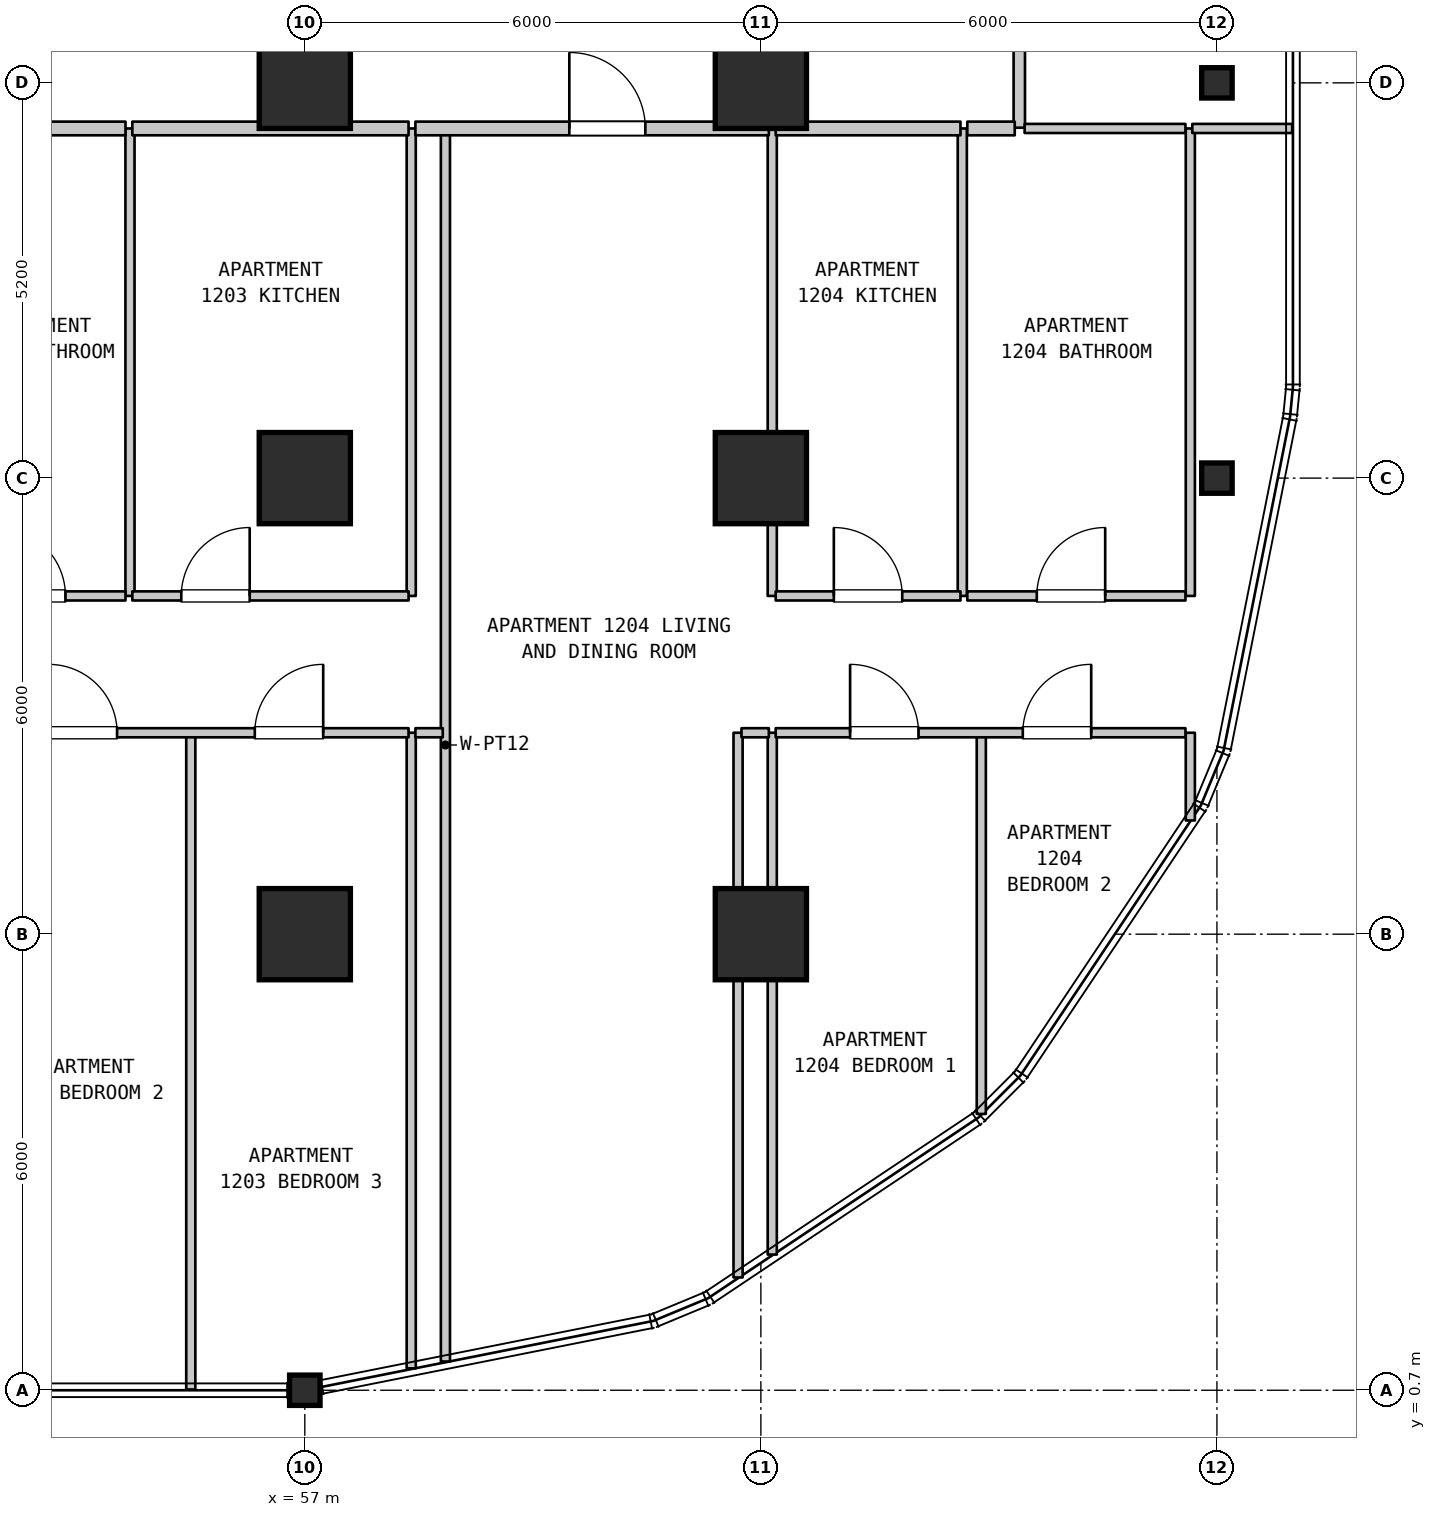
"""IFC4 building model, lengths in metres.
Left out: names, types, materials, properties, quantities, classifications, styles, units other than length and angle.
Written with IfcOpenShell. Run it as: python <this file> out.ifc"""

import sys

from ifc_helpers import new_model, si_unit, direction, frame, frame_2d, origin, origin_2d, place, context, subcontext, project, spatial, rectangle, i_section, extrude, element, fill, save


model = new_model("IFC4")
c1 = context("Model", 3, precision=1e-05, world=origin(), true_north=direction((0.0, 1.0)))
c2 = subcontext(c1, "Body", "Model", "MODEL_VIEW")
j1 = project(units=[si_unit("LENGTHUNIT", "METRE"), si_unit("PLANEANGLEUNIT", "RADIAN")], contexts=[c1])
p1 = place(None, origin())
s1 = spatial("IfcSite", under=j1, at=p1, CompositionType="ELEMENT")
p2 = place(p1, origin())
s2 = spatial("IfcBuilding", under=s1, at=p2, CompositionType="ELEMENT")
p3 = place(p2, frame((0.0, 0.0, 53.6)))
s3 = spatial("IfcBuildingStorey", under=s2, at=p3, CompositionType="ELEMENT", Elevation=53.6)
p4 = place(p3, frame((57.0, 0.7, 0.0), z_axis=(0.0, 0.0, 1.0), x_axis=(1.0, 0.0, 0.0)))
e1 = element("IfcColumn", 1, at=p4, inside=s3, PredefinedType="COLUMN", context=c2, shape_type="SweptSolid", body=[
    extrude(i_section(OverallWidth=0.401, OverallDepth=0.399, WebThickness=0.025, FlangeThickness=0.04, FilletRadius=0.015, at=origin_2d()), origin(), (0.0, 0.0, 1.0), 3.7),
])
for number, where, z_axis, x_axis in (
    (2, (57.0, 6.7, 0.0), (0.0, 0.0, 1.0), (1.0, 0.0, 0.0)),
    (3, (57.0, 12.7, 0.0), (0.0, 0.0, 1.0), (1.0, 0.0, 0.0)),
    (4, (57.0, 17.9, 0.0), (0.0, 0.0, 1.0), (1.0, 0.0, 0.0)),
    (5, (63.0, 6.7, 0.0), (0.0, 0.0, 1.0), (1.0, 0.0, 0.0)),
    (6, (63.0, 12.7, 0.0), (0.0, 0.0, 1.0), (1.0, 0.0, 0.0)),
    (7, (63.0, 17.9, 0.0), (0.0, 0.0, 1.0), (1.0, 0.0, 0.0)),
):
    element("IfcColumn", number, at=place(p3, frame(where, z_axis=z_axis, x_axis=x_axis)), inside=s3, PredefinedType="COLUMN", context=c2, shape_type="SweptSolid", body=[
        extrude(rectangle(XDim=1.2, YDim=1.2, at=origin_2d()), origin(), (0.0, 0.0, 1.0), 3.7),
    ])
for number, where, z_axis, x_axis in (
    (8, (69.0, 12.7, 0.0), (0.0, 0.0, 1.0), (1.0, 0.0, 0.0)),
    (9, (69.0, 17.9, 0.0), (0.0, 0.0, 1.0), (1.0, 0.0, 0.0)),
):
    element("IfcColumn", number, at=place(p3, frame(where, z_axis=z_axis, x_axis=x_axis)), inside=s3, PredefinedType="COLUMN", context=c2, shape_type="SweptSolid", body=[
        extrude(i_section(OverallWidth=0.401, OverallDepth=0.399, WebThickness=0.025, FlangeThickness=0.04, FilletRadius=0.015, at=origin_2d()), origin(), (0.0, 0.0, 1.0), 3.7),
    ])
p5 = place(p3, frame((54.7, 11.15, 0.0), z_axis=(0.0, 0.0, 1.0), x_axis=(0.0, 1.0, 0.0)))
e10 = element("IfcWall", 10, at=p5, inside=s3, PredefinedType="PARTITIONING", context=c2, shape_type="SweptSolid", body=[
    extrude(rectangle(XDim=6.15, YDim=0.12, at=frame_2d((3.075, 0.0))), origin(), (0.0, 0.0, 1.0), 3.385),
])
p6 = place(p3, frame((55.5, 0.71, 0.0), z_axis=(0.0, 0.0, 1.0), x_axis=(0.0, 1.0, 0.0)))
e11 = element("IfcWall", 11, at=p6, inside=s3, PredefinedType="PARTITIONING", context=c2, shape_type="SweptSolid", body=[
    extrude(rectangle(XDim=8.64, YDim=0.12, at=frame_2d((4.32, 0.0))), origin(), (0.0, 0.0, 1.0), 3.385),
])
p7 = place(p3, frame((58.4, 0.988, 0.0), z_axis=(0.0, 0.0, 1.0), x_axis=(0.0, 1.0, 0.0)))
e12 = element("IfcWall", 12, at=p7, inside=s3, PredefinedType="PARTITIONING", context=c2, shape_type="SweptSolid", body=[
    extrude(rectangle(XDim=8.362, YDim=0.12, at=frame_2d((4.181, 0.0))), origin(), (0.0, 0.0, 1.0), 3.385),
])
p8 = place(p3, frame((58.4, 11.15, 0.0), z_axis=(0.0, 0.0, 1.0), x_axis=(0.0, 1.0, 0.0)))
e13 = element("IfcWall", 13, at=p8, inside=s3, PredefinedType="PARTITIONING", context=c2, shape_type="SweptSolid", body=[
    extrude(rectangle(XDim=6.15, YDim=0.12, at=frame_2d((3.075, 0.0))), origin(), (0.0, 0.0, 1.0), 3.385),
])
p9 = place(p3, frame((58.85, 1.078, 0.0), z_axis=(0.0, 0.0, 1.0), x_axis=(0.0, 1.0, 0.0)))
e14 = element("IfcWall", 14, at=p9, inside=s3, PredefinedType="PARTITIONING", context=c2, shape_type="SweptSolid", body=[
    extrude(rectangle(XDim=16.222, YDim=0.12, at=frame_2d((8.111, 0.0))), origin(), (0.0, 0.0, 1.0), 3.385),
])
p10 = place(p3, frame((62.7, 2.184, 0.0), z_axis=(0.0, 0.0, 1.0), x_axis=(0.0, 1.0, 0.0)))
e15 = element("IfcWall", 15, at=p10, inside=s3, PredefinedType="PARTITIONING", context=c2, shape_type="SweptSolid", body=[
    extrude(rectangle(XDim=7.166, YDim=0.12, at=frame_2d((3.583, 0.0))), origin(), (0.0, 0.0, 1.0), 3.385),
])
p11 = place(p3, frame((63.15, 2.485, 0.0), z_axis=(0.0, 0.0, 1.0), x_axis=(0.0, 1.0, 0.0)))
e16 = element("IfcWall", 16, at=p11, inside=s3, PredefinedType="PARTITIONING", context=c2, shape_type="SweptSolid", body=[
    extrude(rectangle(XDim=6.865, YDim=0.12, at=frame_2d((3.433, 0.0))), origin(), (0.0, 0.0, 1.0), 3.385),
])
for number, where, z_axis, x_axis in (
    (17, (63.15, 11.15, 0.0), (0.0, 0.0, 1.0), (0.0, 1.0, 0.0)),
    (18, (65.65, 11.15, 0.0), (0.0, 0.0, 1.0), (0.0, 1.0, 0.0)),
):
    element("IfcWall", number, at=place(p3, frame(where, z_axis=z_axis, x_axis=x_axis)), inside=s3, PredefinedType="PARTITIONING", context=c2, shape_type="SweptSolid", body=[
        extrude(rectangle(XDim=6.15, YDim=0.12, at=frame_2d((3.075, 0.0))), origin(), (0.0, 0.0, 1.0), 3.385),
    ])
p12 = place(p3, frame((65.9, 4.335, 0.0), z_axis=(0.0, 0.0, 1.0), x_axis=(0.0, 1.0, 0.0)))
e19 = element("IfcWall", 19, at=p12, inside=s3, PredefinedType="PARTITIONING", context=c2, shape_type="SweptSolid", body=[
    extrude(rectangle(XDim=5.015, YDim=0.12, at=frame_2d((2.508, 0.0))), origin(), (0.0, 0.0, 1.0), 3.385),
])
p13 = place(p3, frame((66.4, 17.31, 0.0), z_axis=(0.0, 0.0, 1.0), x_axis=(0.0, 1.0, 0.0)))
e20 = element("IfcWall", 20, at=p13, inside=s3, PredefinedType="STANDARD", context=c2, shape_type="SweptSolid", body=[
    extrude(rectangle(XDim=2.19, YDim=0.15, at=frame_2d((1.095, 0.0))), origin(), (0.0, 0.0, 1.0), 3.385),
])
p14 = place(p3, frame((68.65, 8.196, 0.0), z_axis=(0.0, 0.0, 1.0), x_axis=(0.0, 1.0, 0.0)))
e21 = element("IfcWall", 21, at=p14, inside=s3, PredefinedType="PARTITIONING", context=c2, shape_type="SweptSolid", body=[
    extrude(rectangle(XDim=1.154, YDim=0.12, at=frame_2d((0.577, 0.0))), origin(), (0.0, 0.0, 1.0), 3.385),
])
p15 = place(p3, frame((68.65, 11.15, 0.0), z_axis=(0.0, 0.0, 1.0), x_axis=(0.0, 1.0, 0.0)))
e22 = element("IfcWall", 22, at=p15, inside=s3, PredefinedType="PARTITIONING", context=c2, shape_type="SweptSolid", body=[
    extrude(rectangle(XDim=6.15, YDim=0.12, at=frame_2d((3.075, 0.0))), origin(), (0.0, 0.0, 1.0), 3.385),
])
p16 = place(p3, frame((49.795, 9.35, 0.0), z_axis=(0.0, 0.0, 1.0), x_axis=(1.0, 0.0, 0.0)))
e23 = element("IfcWall", 23, at=p16, inside=s3, PredefinedType="PARTITIONING", context=c2, shape_type="SweptSolid", body=[
    extrude(rectangle(XDim=8.57, YDim=0.12, at=frame_2d((4.285, 0.0))), origin(), (0.0, 0.0, 1.0), 3.385),
])
p17 = place(p16, frame((1.124, 0.0, 0.0)))
e24 = element("IfcOpeningElement", 24, at=p17, cuts=e23, PredefinedType="OPENING", context=c2, shape_type="SweptSolid", body=[
    extrude(rectangle(XDim=0.9, YDim=2.15, at=frame_2d((0.45, 1.075))), frame((0.0, 0.07, 0.0), z_axis=(0.0, -1.0, 0.0), x_axis=(1.0, 0.0, 0.0)), (0.0, 0.0, 1.0), 0.14),
])
p18 = place(p16, frame((3.835, 0.0, 0.0)))
e25 = element("IfcOpeningElement", 25, at=p18, cuts=e23, PredefinedType="OPENING", context=c2, shape_type="SweptSolid", body=[
    extrude(rectangle(XDim=0.9, YDim=2.15, at=frame_2d((0.45, 1.075))), frame((0.0, 0.07, 0.0), z_axis=(0.0, -1.0, 0.0), x_axis=(1.0, 0.0, 0.0)), (0.0, 0.0, 1.0), 0.14),
])
p19 = place(p16, frame((6.547, 0.0, 0.0)))
e26 = element("IfcOpeningElement", 26, at=p19, cuts=e23, PredefinedType="OPENING", context=c2, shape_type="SweptSolid", body=[
    extrude(rectangle(XDim=0.9, YDim=2.15, at=frame_2d((0.45, 1.075))), frame((0.0, 0.07, 0.0), z_axis=(0.0, -1.0, 0.0), x_axis=(1.0, 0.0, 0.0)), (0.0, 0.0, 1.0), 0.14),
])
for number, where, z_axis, x_axis in (
    (27, (58.455, 9.35, 0.0), (0.0, 0.0, 1.0), (1.0, 0.0, 0.0)),
    (28, (62.745, 9.35, 0.0), (0.0, 0.0, 1.0), (1.0, 0.0, 0.0)),
):
    element("IfcWall", number, at=place(p3, frame(where, z_axis=z_axis, x_axis=x_axis)), inside=s3, PredefinedType="PARTITIONING", context=c2, shape_type="SweptSolid", body=[
        extrude(rectangle(XDim=0.36, YDim=0.12, at=frame_2d((0.18, 0.0))), origin(), (0.0, 0.0, 1.0), 3.385),
    ])
p20 = place(p3, frame((63.195, 9.35, 0.0), z_axis=(0.0, 0.0, 1.0), x_axis=(1.0, 0.0, 0.0)))
e29 = element("IfcWall", 29, at=p20, inside=s3, PredefinedType="PARTITIONING", context=c2, shape_type="SweptSolid", body=[
    extrude(rectangle(XDim=5.391, YDim=0.12, at=frame_2d((2.695, 0.0))), origin(), (0.0, 0.0, 1.0), 3.385),
])
p21 = place(p20, frame((0.979, 0.0, 0.0)))
e30 = element("IfcOpeningElement", 30, at=p21, cuts=e29, PredefinedType="OPENING", context=c2, shape_type="SweptSolid", body=[
    extrude(rectangle(XDim=0.9, YDim=2.15, at=frame_2d((0.45, 1.075))), frame((0.0, 0.07, 0.0), z_axis=(0.0, -1.0, 0.0), x_axis=(1.0, 0.0, 0.0)), (0.0, 0.0, 1.0), 0.14),
])
p22 = place(p20, frame((3.251, 0.0, 0.0)))
e31 = element("IfcOpeningElement", 31, at=p22, cuts=e29, PredefinedType="OPENING", context=c2, shape_type="SweptSolid", body=[
    extrude(rectangle(XDim=0.9, YDim=2.15, at=frame_2d((0.45, 1.075))), frame((0.0, 0.07, 0.0), z_axis=(0.0, -1.0, 0.0), x_axis=(1.0, 0.0, 0.0)), (0.0, 0.0, 1.0), 0.14),
])
p23 = place(p3, frame((52.371, 11.15, 0.0), z_axis=(0.0, 0.0, 1.0), x_axis=(1.0, 0.0, 0.0)))
e32 = element("IfcWall", 32, at=p23, inside=s3, PredefinedType="PARTITIONING", context=c2, shape_type="SweptSolid", body=[
    extrude(rectangle(XDim=2.27, YDim=0.12, at=frame_2d((1.135, 0.0))), origin(), (0.0, 0.0, 1.0), 3.385),
])
p24 = place(p23, frame((0.58, 0.0, 0.0)))
e33 = element("IfcOpeningElement", 33, at=p24, cuts=e32, PredefinedType="OPENING", context=c2, shape_type="SweptSolid", body=[
    extrude(rectangle(XDim=0.9, YDim=2.1, at=frame_2d((0.45, 1.05))), frame((0.0, 0.07, 0.0), z_axis=(0.0, -1.0, 0.0), x_axis=(1.0, 0.0, 0.0)), (0.0, 0.0, 1.0), 0.14),
])
p25 = place(p3, frame((54.731, 11.15, 0.0), z_axis=(0.0, 0.0, 1.0), x_axis=(1.0, 0.0, 0.0)))
e34 = element("IfcWall", 34, at=p25, inside=s3, PredefinedType="PARTITIONING", context=c2, shape_type="SweptSolid", body=[
    extrude(rectangle(XDim=3.634, YDim=0.12, at=frame_2d((1.817, 0.0))), origin(), (0.0, 0.0, 1.0), 3.385),
])
p26 = place(p25, frame((0.644, 0.0, 0.0)))
e35 = element("IfcOpeningElement", 35, at=p26, cuts=e34, PredefinedType="OPENING", context=c2, shape_type="SweptSolid", body=[
    extrude(rectangle(XDim=0.9, YDim=2.15, at=frame_2d((0.45, 1.075))), frame((0.0, 0.07, 0.0), z_axis=(0.0, -1.0, 0.0), x_axis=(1.0, 0.0, 0.0)), (0.0, 0.0, 1.0), 0.14),
])
p27 = place(p3, frame((63.195, 11.15, 0.0), z_axis=(0.0, 0.0, 1.0), x_axis=(1.0, 0.0, 0.0)))
e36 = element("IfcWall", 36, at=p27, inside=s3, PredefinedType="PARTITIONING", context=c2, shape_type="SweptSolid", body=[
    extrude(rectangle(XDim=2.431, YDim=0.12, at=frame_2d((1.215, 0.0))), origin(), (0.0, 0.0, 1.0), 3.385),
])
p28 = place(p27, frame((0.765, 0.0, 0.0)))
e37 = element("IfcOpeningElement", 37, at=p28, cuts=e36, PredefinedType="OPENING", context=c2, shape_type="SweptSolid", body=[
    extrude(rectangle(XDim=0.9, YDim=2.15, at=frame_2d((0.45, 1.075))), frame((0.0, 0.07, 0.0), z_axis=(0.0, -1.0, 0.0), x_axis=(1.0, 0.0, 0.0)), (0.0, 0.0, 1.0), 0.14),
])
p29 = place(p3, frame((65.716, 11.15, 0.0), z_axis=(0.0, 0.0, 1.0), x_axis=(1.0, 0.0, 0.0)))
e38 = element("IfcWall", 38, at=p29, inside=s3, PredefinedType="PARTITIONING", context=c2, shape_type="SweptSolid", body=[
    extrude(rectangle(XDim=2.87, YDim=0.12, at=frame_2d((1.435, 0.0))), origin(), (0.0, 0.0, 1.0), 3.385),
])
p30 = place(p29, frame((0.914, 0.0, 0.0)))
e39 = element("IfcOpeningElement", 39, at=p30, cuts=e38, PredefinedType="OPENING", context=c2, shape_type="SweptSolid", body=[
    extrude(rectangle(XDim=0.9, YDim=2.1, at=frame_2d((0.45, 1.05))), frame((0.0, 0.07, 0.0), z_axis=(0.0, -1.0, 0.0), x_axis=(1.0, 0.0, 0.0)), (0.0, 0.0, 1.0), 0.14),
])
p31 = place(p3, frame((52.371, 17.3, 0.0), z_axis=(0.0, 0.0, 1.0), x_axis=(1.0, 0.0, 0.0)))
e40 = element("IfcWall", 40, at=p31, inside=s3, PredefinedType="STANDARD", context=c2, shape_type="SweptSolid", body=[
    extrude(rectangle(XDim=2.27, YDim=0.18, at=frame_2d((1.135, 0.0))), origin(), (0.0, 0.0, 1.0), 3.385),
])
p32 = place(p3, frame((54.731, 17.3, 0.0), z_axis=(0.0, 0.0, 1.0), x_axis=(1.0, 0.0, 0.0)))
e41 = element("IfcWall", 41, at=p32, inside=s3, PredefinedType="STANDARD", context=c2, shape_type="SweptSolid", body=[
    extrude(rectangle(XDim=3.634, YDim=0.18, at=frame_2d((1.817, 0.0))), origin(), (0.0, 0.0, 1.0), 3.385),
])
p33 = place(p3, frame((58.455, 17.3, 0.0), z_axis=(0.0, 0.0, 1.0), x_axis=(1.0, 0.0, 0.0)))
e42 = element("IfcWall", 42, at=p33, inside=s3, PredefinedType="STANDARD", context=c2, shape_type="SweptSolid", body=[
    extrude(rectangle(XDim=4.65, YDim=0.18, at=frame_2d((2.325, 0.0))), origin(), (0.0, 0.0, 1.0), 3.385),
])
p34 = place(p33, frame((2.025, 0.0, 0.0)))
e43 = element("IfcOpeningElement", 43, at=p34, cuts=e42, PredefinedType="OPENING", context=c2, shape_type="SweptSolid", body=[
    extrude(rectangle(XDim=1.0, YDim=2.15, at=frame_2d((0.5, 1.075))), frame((0.0, 0.1, 0.0), z_axis=(0.0, -1.0, 0.0), x_axis=(1.0, 0.0, 0.0)), (0.0, 0.0, 1.0), 0.2),
])
p35 = place(p3, frame((63.195, 17.3, 0.0), z_axis=(0.0, 0.0, 1.0), x_axis=(1.0, 0.0, 0.0)))
e44 = element("IfcWall", 44, at=p35, inside=s3, PredefinedType="STANDARD", context=c2, shape_type="SweptSolid", body=[
    extrude(rectangle(XDim=2.431, YDim=0.18, at=frame_2d((1.215, 0.0))), origin(), (0.0, 0.0, 1.0), 3.385),
])
p36 = place(p3, frame((65.716, 17.3, 0.0), z_axis=(0.0, 0.0, 1.0), x_axis=(1.0, 0.0, 0.0)))
e45 = element("IfcWall", 45, at=p36, inside=s3, PredefinedType="STANDARD", context=c2, shape_type="SweptSolid", body=[
    extrude(rectangle(XDim=0.624, YDim=0.18, at=frame_2d((0.312, 0.0))), origin(), (0.0, 0.0, 1.0), 3.385),
])
p37 = place(p3, frame((66.47, 17.3, 0.0), z_axis=(0.0, 0.0, 1.0), x_axis=(1.0, 0.0, 0.0)))
e46 = element("IfcWall", 46, at=p37, inside=s3, PredefinedType="PARTITIONING", context=c2, shape_type="SweptSolid", body=[
    extrude(rectangle(XDim=2.116, YDim=0.12, at=frame_2d((1.058, 0.0))), origin(), (0.0, 0.0, 1.0), 3.385),
])
p38 = place(p3, frame((68.676, 17.3, 0.0), z_axis=(0.0, 0.0, 1.0), x_axis=(1.0, 0.0, 0.0)))
e47 = element("IfcWall", 47, at=p38, inside=s3, PredefinedType="PARTITIONING", context=c2, shape_type="SweptSolid", body=[
    extrude(rectangle(XDim=1.314, YDim=0.12, at=frame_2d((0.657, 0.0))), origin(), (0.0, 0.0, 1.0), 3.385),
])
p39 = place(p18, origin())
e48 = element("IfcDoor", 48, at=p39, inside=s3, OperationType="SINGLE_SWING_LEFT", PredefinedType="DOOR", context=c2, shape_type="SweptSolid", body=[
    extrude(rectangle(XDim=0.9, YDim=2.15, at=frame_2d((0.45, 1.075))), frame((0.0, 0.025, 0.0), z_axis=(0.0, -1.0, 0.0), x_axis=(1.0, 0.0, 0.0)), (0.0, 0.0, 1.0), 0.05),
])
fill(e25, e48)
p40 = place(p19, origin())
e49 = element("IfcDoor", 49, at=p40, inside=s3, OperationType="SINGLE_SWING_RIGHT", PredefinedType="DOOR", context=c2, shape_type="SweptSolid", body=[
    extrude(rectangle(XDim=0.9, YDim=2.15, at=frame_2d((0.45, 1.075))), frame((0.0, 0.025, 0.0), z_axis=(0.0, -1.0, 0.0), x_axis=(1.0, 0.0, 0.0)), (0.0, 0.0, 1.0), 0.05),
])
fill(e26, e49)
p41 = place(p21, origin())
e50 = element("IfcDoor", 50, at=p41, inside=s3, OperationType="SINGLE_SWING_LEFT", PredefinedType="DOOR", context=c2, shape_type="SweptSolid", body=[
    extrude(rectangle(XDim=0.9, YDim=2.15, at=frame_2d((0.45, 1.075))), frame((0.0, 0.025, 0.0), z_axis=(0.0, -1.0, 0.0), x_axis=(1.0, 0.0, 0.0)), (0.0, 0.0, 1.0), 0.05),
])
fill(e30, e50)
p42 = place(p22, origin())
e51 = element("IfcDoor", 51, at=p42, inside=s3, OperationType="SINGLE_SWING_RIGHT", PredefinedType="DOOR", context=c2, shape_type="SweptSolid", body=[
    extrude(rectangle(XDim=0.9, YDim=2.15, at=frame_2d((0.45, 1.075))), frame((0.0, 0.025, 0.0), z_axis=(0.0, -1.0, 0.0), x_axis=(1.0, 0.0, 0.0)), (0.0, 0.0, 1.0), 0.05),
])
fill(e31, e51)
p43 = place(p24, origin())
e52 = element("IfcDoor", 52, at=p43, inside=s3, OperationType="SINGLE_SWING_LEFT", PredefinedType="DOOR", context=c2, shape_type="SweptSolid", body=[
    extrude(rectangle(XDim=0.9, YDim=2.1, at=frame_2d((0.45, 1.05))), frame((0.0, 0.025, 0.0), z_axis=(0.0, -1.0, 0.0), x_axis=(1.0, 0.0, 0.0)), (0.0, 0.0, 1.0), 0.05),
])
fill(e33, e52)
p44 = place(p26, origin())
e53 = element("IfcDoor", 53, at=p44, inside=s3, OperationType="SINGLE_SWING_RIGHT", PredefinedType="DOOR", context=c2, shape_type="SweptSolid", body=[
    extrude(rectangle(XDim=0.9, YDim=2.15, at=frame_2d((0.45, 1.075))), frame((0.0, 0.025, 0.0), z_axis=(0.0, -1.0, 0.0), x_axis=(1.0, 0.0, 0.0)), (0.0, 0.0, 1.0), 0.05),
])
fill(e35, e53)
p45 = place(p28, origin())
e54 = element("IfcDoor", 54, at=p45, inside=s3, OperationType="SINGLE_SWING_LEFT", PredefinedType="DOOR", context=c2, shape_type="SweptSolid", body=[
    extrude(rectangle(XDim=0.9, YDim=2.15, at=frame_2d((0.45, 1.075))), frame((0.0, 0.025, 0.0), z_axis=(0.0, -1.0, 0.0), x_axis=(1.0, 0.0, 0.0)), (0.0, 0.0, 1.0), 0.05),
])
fill(e37, e54)
p46 = place(p30, origin())
e55 = element("IfcDoor", 55, at=p46, inside=s3, OperationType="SINGLE_SWING_RIGHT", PredefinedType="DOOR", context=c2, shape_type="SweptSolid", body=[
    extrude(rectangle(XDim=0.9, YDim=2.1, at=frame_2d((0.45, 1.05))), frame((0.0, 0.025, 0.0), z_axis=(0.0, -1.0, 0.0), x_axis=(1.0, 0.0, 0.0)), (0.0, 0.0, 1.0), 0.05),
])
fill(e39, e55)
p47 = place(p34, origin())
e56 = element("IfcDoor", 56, at=p47, inside=s3, OperationType="SINGLE_SWING_LEFT", PredefinedType="DOOR", context=c2, shape_type="SweptSolid", body=[
    extrude(rectangle(XDim=1.0, YDim=2.15, at=frame_2d((0.5, 1.075))), frame((0.0, 0.025, 0.0), z_axis=(0.0, -1.0, 0.0), x_axis=(1.0, 0.0, 0.0)), (0.0, 0.0, 1.0), 0.05),
])
fill(e43, e56)
save(model, sys.argv[1])
